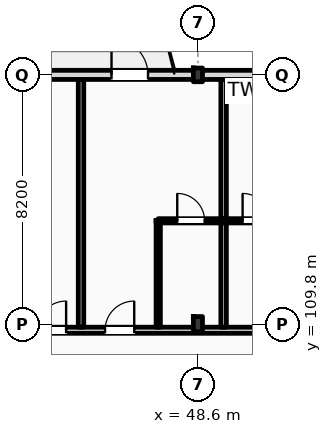
"""IFC4 building model, lengths in metres.
Left out: names, types, materials, properties, quantities, classifications, styles, units other than length and angle.
Written with IfcOpenShell. Run it as: python <this file> out.ifc"""

import sys

from ifc_helpers import new_model, si_unit, direction, frame, frame_2d, origin, origin_2d, place, context, subcontext, project, spatial, rectangle, i_section, extrude, element, fill, save


model = new_model("IFC4")
c1 = context("Model", 3, precision=1e-05, world=origin(), true_north=direction((0.0, 1.0)))
c2 = subcontext(c1, "Body", "Model", "MODEL_VIEW")
j1 = project(units=[si_unit("LENGTHUNIT", "METRE"), si_unit("PLANEANGLEUNIT", "RADIAN")], contexts=[c1])
p1 = place(None, origin())
s1 = spatial("IfcSite", under=j1, at=p1, CompositionType="ELEMENT")
p2 = place(p1, origin())
s2 = spatial("IfcBuilding", under=s1, at=p2, CompositionType="ELEMENT")
p3 = place(p2, frame((0.0, 0.0, 28.2)))
s3 = spatial("IfcBuildingStorey", under=s2, at=p3, CompositionType="ELEMENT", Elevation=28.2)
p4 = place(p3, frame((48.6, 109.8, 0.0), z_axis=(0.0, 0.0, 1.0), x_axis=(1.0, 0.0, 0.0)))
e1 = element("IfcColumn", 1, at=p4, inside=s3, PredefinedType="COLUMN", context=c2, shape_type="SweptSolid", body=[
    extrude(i_section(OverallWidth=0.3, OverallDepth=0.5, WebThickness=0.014, FlangeThickness=0.028, FilletRadius=0.027, at=origin_2d()), origin(), (0.0, 0.0, 1.0), 3.6),
])
p5 = place(p3, frame((48.6, 118.0, 0.0), z_axis=(0.0, 0.0, 1.0), x_axis=(1.0, 0.0, 0.0)))
e2 = element("IfcColumn", 2, at=p5, inside=s3, PredefinedType="COLUMN", context=c2, shape_type="SweptSolid", body=[
    extrude(i_section(OverallWidth=0.3, OverallDepth=0.45, WebThickness=0.014, FlangeThickness=0.026, FilletRadius=0.027, at=origin_2d()), origin(), (0.0, 0.0, 1.0), 3.6),
])
p6 = place(p3, frame((22.5, 118.0, 0.0), z_axis=(0.0, 0.0, 1.0), x_axis=(1.0, 0.0, 0.0)))
e3 = element("IfcWall", 3, at=p6, inside=s3, PredefinedType="STANDARD", context=c2, shape_type="SweptSolid", body=[
    extrude(rectangle(XDim=97.5, YDim=0.3, at=frame_2d((48.75, 0.0))), origin(), (0.0, 0.0, 1.0), 2.8),
])
p7 = place(p6, frame((0.91, 0.0, 0.9)))
e4 = element("IfcOpeningElement", 4, at=p7, cuts=e3, PredefinedType="OPENING", context=c2, shape_type="SweptSolid", body=[
    extrude(rectangle(XDim=0.9, YDim=1.72, at=frame_2d((0.45, 0.86))), frame((0.0, 0.16, 0.0), z_axis=(0.0, -1.0, 0.0), x_axis=(1.0, 0.0, 0.0)), (0.0, 0.0, 1.0), 0.32),
])
p8 = place(p6, frame((6.561, 0.0, 0.0)))
e5 = element("IfcOpeningElement", 5, at=p8, cuts=e3, PredefinedType="OPENING", context=c2, shape_type="SweptSolid", body=[
    extrude(rectangle(XDim=1.2, YDim=2.25, at=frame_2d((0.6, 1.125))), frame((0.0, 0.16, 0.0), z_axis=(0.0, -1.0, 0.0), x_axis=(1.0, 0.0, 0.0)), (0.0, 0.0, 1.0), 0.32),
])
p9 = place(p6, frame((11.477, 0.0, 0.9)))
e6 = element("IfcOpeningElement", 6, at=p9, cuts=e3, PredefinedType="OPENING", context=c2, shape_type="SweptSolid", body=[
    extrude(rectangle(XDim=1.1, YDim=1.5, at=frame_2d((0.55, 0.75))), frame((0.0, 0.16, 0.0), z_axis=(0.0, -1.0, 0.0), x_axis=(1.0, 0.0, 0.0)), (0.0, 0.0, 1.0), 0.32),
])
p10 = place(p6, frame((15.194, 0.0, 0.9)))
e7 = element("IfcOpeningElement", 7, at=p10, cuts=e3, PredefinedType="OPENING", context=c2, shape_type="SweptSolid", body=[
    extrude(rectangle(XDim=1.25, YDim=1.6, at=frame_2d((0.625, 0.8))), frame((0.0, 0.16, 0.0), z_axis=(0.0, -1.0, 0.0), x_axis=(1.0, 0.0, 0.0)), (0.0, 0.0, 1.0), 0.32),
])
p11 = place(p6, frame((19.509, 0.0, 0.9)))
e8 = element("IfcOpeningElement", 8, at=p11, cuts=e3, PredefinedType="OPENING", context=c2, shape_type="SweptSolid", body=[
    extrude(rectangle(XDim=1.4, YDim=1.7, at=frame_2d((0.7, 0.85))), frame((0.0, 0.16, 0.0), z_axis=(0.0, -1.0, 0.0), x_axis=(1.0, 0.0, 0.0)), (0.0, 0.0, 1.0), 0.32),
])
p12 = place(p6, frame((23.258, 0.0, 0.0)))
e9 = element("IfcOpeningElement", 9, at=p12, cuts=e3, PredefinedType="OPENING", context=c2, shape_type="SweptSolid", body=[
    extrude(rectangle(XDim=1.2, YDim=2.25, at=frame_2d((0.6, 1.125))), frame((0.0, 0.16, 0.0), z_axis=(0.0, -1.0, 0.0), x_axis=(1.0, 0.0, 0.0)), (0.0, 0.0, 1.0), 0.32),
])
p13 = place(p6, frame((28.115, 0.0, 0.9)))
e10 = element("IfcOpeningElement", 10, at=p13, cuts=e3, PredefinedType="OPENING", context=c2, shape_type="SweptSolid", body=[
    extrude(rectangle(XDim=1.75, YDim=1.72, at=frame_2d((0.875, 0.86))), frame((0.0, 0.16, 0.0), z_axis=(0.0, -1.0, 0.0), x_axis=(1.0, 0.0, 0.0)), (0.0, 0.0, 1.0), 0.32),
])
p14 = place(p6, frame((31.582, 0.0, 0.9)))
e11 = element("IfcOpeningElement", 11, at=p14, cuts=e3, PredefinedType="OPENING", context=c2, shape_type="SweptSolid", body=[
    extrude(rectangle(XDim=1.35, YDim=1.72, at=frame_2d((0.675, 0.86))), frame((0.0, 0.16, 0.0), z_axis=(0.0, -1.0, 0.0), x_axis=(1.0, 0.0, 0.0)), (0.0, 0.0, 1.0), 0.32),
])
p15 = place(p6, frame((37.379, 0.0, 0.0)))
e12 = element("IfcOpeningElement", 12, at=p15, cuts=e3, PredefinedType="OPENING", context=c2, shape_type="SweptSolid", body=[
    extrude(rectangle(XDim=1.2, YDim=2.25, at=frame_2d((0.6, 1.125))), frame((0.0, 0.16, 0.0), z_axis=(0.0, -1.0, 0.0), x_axis=(1.0, 0.0, 0.0)), (0.0, 0.0, 1.0), 0.32),
])
p16 = place(p6, frame((42.663, 0.0, 0.9)))
e13 = element("IfcOpeningElement", 13, at=p16, cuts=e3, PredefinedType="OPENING", context=c2, shape_type="SweptSolid", body=[
    extrude(rectangle(XDim=1.35, YDim=1.72, at=frame_2d((0.675, 0.86))), frame((0.0, 0.16, 0.0), z_axis=(0.0, -1.0, 0.0), x_axis=(1.0, 0.0, 0.0)), (0.0, 0.0, 1.0), 0.32),
])
p17 = place(p6, frame((45.119, 0.0, 0.9)))
e14 = element("IfcOpeningElement", 14, at=p17, cuts=e3, PredefinedType="OPENING", context=c2, shape_type="SweptSolid", body=[
    extrude(rectangle(XDim=2.871, YDim=1.72, at=frame_2d((1.436, 0.86))), frame((0.0, 0.16, 0.0), z_axis=(0.0, -1.0, 0.0), x_axis=(1.0, 0.0, 0.0)), (0.0, 0.0, 1.0), 0.32),
])
p18 = place(p6, frame((50.41, 0.0, 0.9)))
e15 = element("IfcOpeningElement", 15, at=p18, cuts=e3, PredefinedType="OPENING", context=c2, shape_type="SweptSolid", body=[
    extrude(rectangle(XDim=1.8, YDim=1.72, at=frame_2d((0.9, 0.86))), frame((0.0, 0.16, 0.0), z_axis=(0.0, -1.0, 0.0), x_axis=(1.0, 0.0, 0.0)), (0.0, 0.0, 1.0), 0.32),
])
p19 = place(p6, frame((54.375, 0.0, 0.0)))
e16 = element("IfcOpeningElement", 16, at=p19, cuts=e3, PredefinedType="OPENING", context=c2, shape_type="SweptSolid", body=[
    extrude(rectangle(XDim=1.2, YDim=2.25, at=frame_2d((0.6, 1.125))), frame((0.0, 0.16, 0.0), z_axis=(0.0, -1.0, 0.0), x_axis=(1.0, 0.0, 0.0)), (0.0, 0.0, 1.0), 0.32),
])
p20 = place(p6, frame((59.052, 0.0, 0.9)))
e17 = element("IfcOpeningElement", 17, at=p20, cuts=e3, PredefinedType="OPENING", context=c2, shape_type="SweptSolid", body=[
    extrude(rectangle(XDim=1.35, YDim=1.72, at=frame_2d((0.675, 0.86))), frame((0.0, 0.16, 0.0), z_axis=(0.0, -1.0, 0.0), x_axis=(1.0, 0.0, 0.0)), (0.0, 0.0, 1.0), 0.32),
])
p21 = place(p6, frame((62.768, 0.0, 0.9)))
e18 = element("IfcOpeningElement", 18, at=p21, cuts=e3, PredefinedType="OPENING", context=c2, shape_type="SweptSolid", body=[
    extrude(rectangle(XDim=1.5, YDim=1.72, at=frame_2d((0.75, 0.86))), frame((0.0, 0.16, 0.0), z_axis=(0.0, -1.0, 0.0), x_axis=(1.0, 0.0, 0.0)), (0.0, 0.0, 1.0), 0.32),
])
p22 = place(p6, frame((68.498, 0.0, 0.0)))
e19 = element("IfcOpeningElement", 19, at=p22, cuts=e3, PredefinedType="OPENING", context=c2, shape_type="SweptSolid", body=[
    extrude(rectangle(XDim=1.2, YDim=2.25, at=frame_2d((0.6, 1.125))), frame((0.0, 0.16, 0.0), z_axis=(0.0, -1.0, 0.0), x_axis=(1.0, 0.0, 0.0)), (0.0, 0.0, 1.0), 0.32),
])
p23 = place(p6, frame((71.265, 0.0, 0.9)))
e20 = element("IfcOpeningElement", 20, at=p23, cuts=e3, PredefinedType="OPENING", context=c2, shape_type="SweptSolid", body=[
    extrude(rectangle(XDim=0.9, YDim=1.72, at=frame_2d((0.45, 0.86))), frame((0.0, 0.16, 0.0), z_axis=(0.0, -1.0, 0.0), x_axis=(1.0, 0.0, 0.0)), (0.0, 0.0, 1.0), 0.32),
])
p24 = place(p6, frame((76.316, 0.0, 0.9)))
e21 = element("IfcOpeningElement", 21, at=p24, cuts=e3, PredefinedType="OPENING", context=c2, shape_type="SweptSolid", body=[
    extrude(rectangle(XDim=1.95, YDim=1.72, at=frame_2d((0.975, 0.86))), frame((0.0, 0.16, 0.0), z_axis=(0.0, -1.0, 0.0), x_axis=(1.0, 0.0, 0.0)), (0.0, 0.0, 1.0), 0.32),
])
p25 = place(p6, frame((81.632, 0.0, 0.9)))
e22 = element("IfcOpeningElement", 22, at=p25, cuts=e3, PredefinedType="OPENING", context=c2, shape_type="SweptSolid", body=[
    extrude(rectangle(XDim=1.35, YDim=1.72, at=frame_2d((0.675, 0.86))), frame((0.0, 0.16, 0.0), z_axis=(0.0, -1.0, 0.0), x_axis=(1.0, 0.0, 0.0)), (0.0, 0.0, 1.0), 0.32),
])
p26 = place(p6, frame((84.948, 0.0, 0.9)))
e23 = element("IfcOpeningElement", 23, at=p26, cuts=e3, PredefinedType="OPENING", context=c2, shape_type="SweptSolid", body=[
    extrude(rectangle(XDim=2.25, YDim=1.72, at=frame_2d((1.125, 0.86))), frame((0.0, 0.16, 0.0), z_axis=(0.0, -1.0, 0.0), x_axis=(1.0, 0.0, 0.0)), (0.0, 0.0, 1.0), 0.32),
])
p27 = place(p6, frame((90.063, 0.0, 0.9)))
e24 = element("IfcOpeningElement", 24, at=p27, cuts=e3, PredefinedType="OPENING", context=c2, shape_type="SweptSolid", body=[
    extrude(rectangle(XDim=1.8, YDim=1.72, at=frame_2d((0.9, 0.86))), frame((0.0, 0.16, 0.0), z_axis=(0.0, -1.0, 0.0), x_axis=(1.0, 0.0, 0.0)), (0.0, 0.0, 1.0), 0.32),
])
p28 = place(p6, frame((93.529, 0.0, 0.9)))
e25 = element("IfcOpeningElement", 25, at=p28, cuts=e3, PredefinedType="OPENING", context=c2, shape_type="SweptSolid", body=[
    extrude(rectangle(XDim=2.55, YDim=1.72, at=frame_2d((1.275, 0.86))), frame((0.0, 0.16, 0.0), z_axis=(0.0, -1.0, 0.0), x_axis=(1.0, 0.0, 0.0)), (0.0, 0.0, 1.0), 0.32),
])
p29 = place(p3, frame((10.65, 109.6, 0.0), z_axis=(0.0, 0.0, 1.0), x_axis=(1.0, 0.0, 0.0)))
e26 = element("IfcWall", 26, at=p29, inside=s3, PredefinedType="PARTITIONING", context=c2, shape_type="SweptSolid", body=[
    extrude(rectangle(XDim=109.21, YDim=0.2, at=frame_2d((54.605, 0.0))), origin(), (0.0, 0.0, 1.0), 2.8),
])
p30 = place(p29, frame((12.611, 0.0, 0.0)))
e27 = element("IfcOpeningElement", 27, at=p30, cuts=e26, PredefinedType="OPENING", context=c2, shape_type="SweptSolid", body=[
    extrude(rectangle(XDim=1.02, YDim=2.2, at=frame_2d((0.51, 1.1))), frame((0.0, 0.11, 0.0), z_axis=(0.0, -1.0, 0.0), x_axis=(1.0, 0.0, 0.0)), (0.0, 0.0, 1.0), 0.22),
])
p31 = place(p29, frame((19.451, 0.0, 0.0)))
e28 = element("IfcOpeningElement", 28, at=p31, cuts=e26, PredefinedType="OPENING", context=c2, shape_type="SweptSolid", body=[
    extrude(rectangle(XDim=1.02, YDim=2.2, at=frame_2d((0.51, 1.1))), frame((0.0, 0.11, 0.0), z_axis=(0.0, -1.0, 0.0), x_axis=(1.0, 0.0, 0.0)), (0.0, 0.0, 1.0), 0.22),
])
p32 = place(p29, frame((23.842, 0.0, 0.0)))
e29 = element("IfcOpeningElement", 29, at=p32, cuts=e26, PredefinedType="OPENING", context=c2, shape_type="SweptSolid", body=[
    extrude(rectangle(XDim=1.02, YDim=2.2, at=frame_2d((0.51, 1.1))), frame((0.0, 0.11, 0.0), z_axis=(0.0, -1.0, 0.0), x_axis=(1.0, 0.0, 0.0)), (0.0, 0.0, 1.0), 0.22),
])
p33 = place(p29, frame((26.084, 0.0, 0.0)))
e30 = element("IfcOpeningElement", 30, at=p33, cuts=e26, PredefinedType="OPENING", context=c2, shape_type="SweptSolid", body=[
    extrude(rectangle(XDim=1.02, YDim=2.2, at=frame_2d((0.51, 1.1))), frame((0.0, 0.11, 0.0), z_axis=(0.0, -1.0, 0.0), x_axis=(1.0, 0.0, 0.0)), (0.0, 0.0, 1.0), 0.22),
])
p34 = place(p29, frame((32.655, 0.0, 0.0)))
e31 = element("IfcOpeningElement", 31, at=p34, cuts=e26, PredefinedType="OPENING", context=c2, shape_type="SweptSolid", body=[
    extrude(rectangle(XDim=0.96, YDim=2.2, at=frame_2d((0.48, 1.1))), frame((0.0, 0.11, 0.0), z_axis=(0.0, -1.0, 0.0), x_axis=(1.0, 0.0, 0.0)), (0.0, 0.0, 1.0), 0.22),
])
p35 = place(p29, frame((34.895, 0.0, 0.0)))
e32 = element("IfcOpeningElement", 32, at=p35, cuts=e26, PredefinedType="OPENING", context=c2, shape_type="SweptSolid", body=[
    extrude(rectangle(XDim=0.96, YDim=2.2, at=frame_2d((0.48, 1.1))), frame((0.0, 0.11, 0.0), z_axis=(0.0, -1.0, 0.0), x_axis=(1.0, 0.0, 0.0)), (0.0, 0.0, 1.0), 0.22),
])
p36 = place(p29, frame((41.436, 0.0, 0.0)))
e33 = element("IfcOpeningElement", 33, at=p36, cuts=e26, PredefinedType="OPENING", context=c2, shape_type="SweptSolid", body=[
    extrude(rectangle(XDim=0.96, YDim=2.2, at=frame_2d((0.48, 1.1))), frame((0.0, 0.11, 0.0), z_axis=(0.0, -1.0, 0.0), x_axis=(1.0, 0.0, 0.0)), (0.0, 0.0, 1.0), 0.22),
])
p37 = place(p29, frame((43.427, 0.0, 0.0)))
e34 = element("IfcOpeningElement", 34, at=p37, cuts=e26, PredefinedType="OPENING", context=c2, shape_type="SweptSolid", body=[
    extrude(rectangle(XDim=0.96, YDim=2.2, at=frame_2d((0.48, 1.1))), frame((0.0, 0.11, 0.0), z_axis=(0.0, -1.0, 0.0), x_axis=(1.0, 0.0, 0.0)), (0.0, 0.0, 1.0), 0.22),
])
p38 = place(p29, frame((50.218, 0.0, 0.0)))
e35 = element("IfcOpeningElement", 35, at=p38, cuts=e26, PredefinedType="OPENING", context=c2, shape_type="SweptSolid", body=[
    extrude(rectangle(XDim=0.96, YDim=2.2, at=frame_2d((0.48, 1.1))), frame((0.0, 0.11, 0.0), z_axis=(0.0, -1.0, 0.0), x_axis=(1.0, 0.0, 0.0)), (0.0, 0.0, 1.0), 0.22),
])
p39 = place(p29, frame((54.859, 0.0, 0.0)))
e36 = element("IfcOpeningElement", 36, at=p39, cuts=e26, PredefinedType="OPENING", context=c2, shape_type="SweptSolid", body=[
    extrude(rectangle(XDim=0.96, YDim=2.2, at=frame_2d((0.48, 1.1))), frame((0.0, 0.11, 0.0), z_axis=(0.0, -1.0, 0.0), x_axis=(1.0, 0.0, 0.0)), (0.0, 0.0, 1.0), 0.22),
])
p40 = place(p29, frame((59.0, 0.0, 0.0)))
e37 = element("IfcOpeningElement", 37, at=p40, cuts=e26, PredefinedType="OPENING", context=c2, shape_type="SweptSolid", body=[
    extrude(rectangle(XDim=0.96, YDim=2.2, at=frame_2d((0.48, 1.1))), frame((0.0, 0.11, 0.0), z_axis=(0.0, -1.0, 0.0), x_axis=(1.0, 0.0, 0.0)), (0.0, 0.0, 1.0), 0.22),
])
p41 = place(p29, frame((63.39, 0.0, 0.0)))
e38 = element("IfcOpeningElement", 38, at=p41, cuts=e26, PredefinedType="OPENING", context=c2, shape_type="SweptSolid", body=[
    extrude(rectangle(XDim=0.96, YDim=2.2, at=frame_2d((0.48, 1.1))), frame((0.0, 0.11, 0.0), z_axis=(0.0, -1.0, 0.0), x_axis=(1.0, 0.0, 0.0)), (0.0, 0.0, 1.0), 0.22),
])
p42 = place(p29, frame((65.631, 0.0, 0.0)))
e39 = element("IfcOpeningElement", 39, at=p42, cuts=e26, PredefinedType="OPENING", context=c2, shape_type="SweptSolid", body=[
    extrude(rectangle(XDim=0.96, YDim=2.2, at=frame_2d((0.48, 1.1))), frame((0.0, 0.11, 0.0), z_axis=(0.0, -1.0, 0.0), x_axis=(1.0, 0.0, 0.0)), (0.0, 0.0, 1.0), 0.22),
])
p43 = place(p29, frame((72.172, 0.0, 0.0)))
e40 = element("IfcOpeningElement", 40, at=p43, cuts=e26, PredefinedType="OPENING", context=c2, shape_type="SweptSolid", body=[
    extrude(rectangle(XDim=0.96, YDim=2.2, at=frame_2d((0.48, 1.1))), frame((0.0, 0.11, 0.0), z_axis=(0.0, -1.0, 0.0), x_axis=(1.0, 0.0, 0.0)), (0.0, 0.0, 1.0), 0.22),
])
p44 = place(p29, frame((74.413, 0.0, 0.0)))
e41 = element("IfcOpeningElement", 41, at=p44, cuts=e26, PredefinedType="OPENING", context=c2, shape_type="SweptSolid", body=[
    extrude(rectangle(XDim=0.96, YDim=2.2, at=frame_2d((0.48, 1.1))), frame((0.0, 0.11, 0.0), z_axis=(0.0, -1.0, 0.0), x_axis=(1.0, 0.0, 0.0)), (0.0, 0.0, 1.0), 0.22),
])
p45 = place(p29, frame((80.954, 0.0, 0.0)))
e42 = element("IfcOpeningElement", 42, at=p45, cuts=e26, PredefinedType="OPENING", context=c2, shape_type="SweptSolid", body=[
    extrude(rectangle(XDim=0.96, YDim=2.2, at=frame_2d((0.48, 1.1))), frame((0.0, 0.11, 0.0), z_axis=(0.0, -1.0, 0.0), x_axis=(1.0, 0.0, 0.0)), (0.0, 0.0, 1.0), 0.22),
])
p46 = place(p29, frame((83.195, 0.0, 0.0)))
e43 = element("IfcOpeningElement", 43, at=p46, cuts=e26, PredefinedType="OPENING", context=c2, shape_type="SweptSolid", body=[
    extrude(rectangle(XDim=0.96, YDim=2.2, at=frame_2d((0.48, 1.1))), frame((0.0, 0.11, 0.0), z_axis=(0.0, -1.0, 0.0), x_axis=(1.0, 0.0, 0.0)), (0.0, 0.0, 1.0), 0.22),
])
p47 = place(p29, frame((89.735, 0.0, 0.0)))
e44 = element("IfcOpeningElement", 44, at=p47, cuts=e26, PredefinedType="OPENING", context=c2, shape_type="SweptSolid", body=[
    extrude(rectangle(XDim=0.96, YDim=2.2, at=frame_2d((0.48, 1.1))), frame((0.0, 0.11, 0.0), z_axis=(0.0, -1.0, 0.0), x_axis=(1.0, 0.0, 0.0)), (0.0, 0.0, 1.0), 0.22),
])
p48 = place(p29, frame((94.126, 0.0, 0.0)))
e45 = element("IfcOpeningElement", 45, at=p48, cuts=e26, PredefinedType="OPENING", context=c2, shape_type="SweptSolid", body=[
    extrude(rectangle(XDim=0.96, YDim=2.2, at=frame_2d((0.48, 1.1))), frame((0.0, 0.11, 0.0), z_axis=(0.0, -1.0, 0.0), x_axis=(1.0, 0.0, 0.0)), (0.0, 0.0, 1.0), 0.22),
])
p49 = place(p29, frame((98.517, 0.0, 0.0)))
e46 = element("IfcOpeningElement", 46, at=p49, cuts=e26, PredefinedType="OPENING", context=c2, shape_type="SweptSolid", body=[
    extrude(rectangle(XDim=0.96, YDim=2.2, at=frame_2d((0.48, 1.1))), frame((0.0, 0.11, 0.0), z_axis=(0.0, -1.0, 0.0), x_axis=(1.0, 0.0, 0.0)), (0.0, 0.0, 1.0), 0.22),
])
p50 = place(p29, frame((102.908, 0.0, 0.0)))
e47 = element("IfcOpeningElement", 47, at=p50, cuts=e26, PredefinedType="OPENING", context=c2, shape_type="SweptSolid", body=[
    extrude(rectangle(XDim=0.96, YDim=2.2, at=frame_2d((0.48, 1.1))), frame((0.0, 0.11, 0.0), z_axis=(0.0, -1.0, 0.0), x_axis=(1.0, 0.0, 0.0)), (0.0, 0.0, 1.0), 0.22),
])
p51 = place(p29, frame((105.099, 0.0, 0.0)))
e48 = element("IfcOpeningElement", 48, at=p51, cuts=e26, PredefinedType="OPENING", context=c2, shape_type="SweptSolid", body=[
    extrude(rectangle(XDim=0.96, YDim=2.2, at=frame_2d((0.48, 1.1))), frame((0.0, 0.11, 0.0), z_axis=(0.0, -1.0, 0.0), x_axis=(1.0, 0.0, 0.0)), (0.0, 0.0, 1.0), 0.22),
])
p52 = place(p29, frame((2.716, 0.0, 0.0)))
e49 = element("IfcOpeningElement", 49, at=p52, cuts=e26, PredefinedType="OPENING", context=c2, shape_type="SweptSolid", body=[
    extrude(rectangle(XDim=1.35, YDim=2.25, at=frame_2d((0.675, 1.125))), frame((0.0, 0.11, 0.0), z_axis=(0.0, -1.0, 0.0), x_axis=(1.0, 0.0, 0.0)), (0.0, 0.0, 1.0), 0.22),
])
p53 = place(p29, frame((6.65, 0.0, 0.0)))
e50 = element("IfcOpeningElement", 50, at=p53, cuts=e26, PredefinedType="OPENING", context=c2, shape_type="SweptSolid", body=[
    extrude(rectangle(XDim=1.35, YDim=2.25, at=frame_2d((0.675, 1.125))), frame((0.0, 0.11, 0.0), z_axis=(0.0, -1.0, 0.0), x_axis=(1.0, 0.0, 0.0)), (0.0, 0.0, 1.0), 0.22),
])
p54 = place(p29, frame((10.583, 0.0, 0.0)))
e51 = element("IfcOpeningElement", 51, at=p54, cuts=e26, PredefinedType="OPENING", context=c2, shape_type="SweptSolid", body=[
    extrude(rectangle(XDim=1.35, YDim=2.25, at=frame_2d((0.675, 1.125))), frame((0.0, 0.11, 0.0), z_axis=(0.0, -1.0, 0.0), x_axis=(1.0, 0.0, 0.0)), (0.0, 0.0, 1.0), 0.22),
])
for number, where, z_axis, x_axis in (
    (52, (44.755, 109.7, 0.0), (0.0, 0.0, 1.0), (0.0, 1.0, 0.0)),
    (53, (49.445, 109.7, 0.0), (0.0, 0.0, 1.0), (0.0, 1.0, 0.0)),
):
    element("IfcWall", number, at=place(p3, frame(where, z_axis=z_axis, x_axis=x_axis)), inside=s3, PredefinedType="PARTITIONING", context=c2, shape_type="SweptSolid", body=[
        extrude(rectangle(XDim=8.15, YDim=0.18, at=frame_2d((4.075, 0.0))), origin(), (0.0, 0.0, 1.0), 3.36),
    ])
p55 = place(p3, frame((47.295, 109.7, 0.0), z_axis=(0.0, 0.0, 1.0), x_axis=(0.0, 1.0, 0.0)))
e54 = element("IfcWall", 54, at=p55, inside=s3, PredefinedType="PARTITIONING", context=c2, shape_type="SweptSolid", body=[
    extrude(rectangle(XDim=3.5, YDim=0.14, at=frame_2d((1.75, 0.0))), origin(), (0.0, 0.0, 1.0), 3.36),
])
p56 = place(p3, frame((47.295, 113.2, 0.0), z_axis=(0.0, 0.0, 1.0), x_axis=(1.0, 0.0, 0.0)))
e55 = element("IfcWall", 55, at=p56, inside=s3, PredefinedType="PARTITIONING", context=c2, shape_type="SweptSolid", body=[
    extrude(rectangle(XDim=2.15, YDim=0.14, at=frame_2d((1.075, 0.0))), origin(), (0.0, 0.0, 1.0), 3.36),
])
p57 = place(p56, frame((0.625, 0.0, 0.0)))
e56 = element("IfcOpeningElement", 56, at=p57, cuts=e55, PredefinedType="OPENING", context=c2, shape_type="SweptSolid", body=[
    extrude(rectangle(XDim=0.9, YDim=2.1, at=frame_2d((0.45, 1.05))), frame((0.0, 0.08, 0.0), z_axis=(0.0, -1.0, 0.0), x_axis=(1.0, 0.0, 0.0)), (0.0, 0.0, 1.0), 0.16),
])
p58 = place(p3, frame((49.445, 113.2, 0.0), z_axis=(0.0, 0.0, 1.0), x_axis=(1.0, 0.0, 0.0)))
e57 = element("IfcWall", 57, at=p58, inside=s3, PredefinedType="PARTITIONING", context=c2, shape_type="SweptSolid", body=[
    extrude(rectangle(XDim=2.15, YDim=0.14, at=frame_2d((1.075, 0.0))), origin(), (0.0, 0.0, 1.0), 3.36),
])
p59 = place(p58, frame((0.625, 0.0, 0.0)))
e58 = element("IfcOpeningElement", 58, at=p59, cuts=e57, PredefinedType="OPENING", context=c2, shape_type="SweptSolid", body=[
    extrude(rectangle(XDim=0.9, YDim=2.1, at=frame_2d((0.45, 1.05))), frame((0.0, 0.08, 0.0), z_axis=(0.0, -1.0, 0.0), x_axis=(1.0, 0.0, 0.0)), (0.0, 0.0, 1.0), 0.16),
])
p60 = place(p12, origin())
e59 = element("IfcDoor", 59, at=p60, inside=s3, OperationType="SINGLE_SWING_LEFT", PredefinedType="DOOR", context=c2, shape_type="SweptSolid", body=[
    extrude(rectangle(XDim=1.2, YDim=2.25, at=frame_2d((0.6, 1.125))), frame((0.0, 0.025, 0.0), z_axis=(0.0, -1.0, 0.0), x_axis=(1.0, 0.0, 0.0)), (0.0, 0.0, 1.0), 0.05),
])
fill(e9, e59)
p61 = place(p34, origin())
e60 = element("IfcDoor", 60, at=p61, inside=s3, OperationType="SINGLE_SWING_RIGHT", PredefinedType="DOOR", context=c2, shape_type="SweptSolid", body=[
    extrude(rectangle(XDim=0.96, YDim=2.2, at=frame_2d((0.48, 1.1))), frame((0.0, 0.025, 0.0), z_axis=(0.0, -1.0, 0.0), x_axis=(1.0, 0.0, 0.0)), (0.0, 0.0, 1.0), 0.05),
])
fill(e31, e60)
p62 = place(p35, origin())
e61 = element("IfcDoor", 61, at=p62, inside=s3, OperationType="SINGLE_SWING_RIGHT", PredefinedType="DOOR", context=c2, shape_type="SweptSolid", body=[
    extrude(rectangle(XDim=0.96, YDim=2.2, at=frame_2d((0.48, 1.1))), frame((0.0, 0.025, 0.0), z_axis=(0.0, -1.0, 0.0), x_axis=(1.0, 0.0, 0.0)), (0.0, 0.0, 1.0), 0.05),
])
fill(e32, e61)
p63 = place(p57, origin())
e62 = element("IfcDoor", 62, at=p63, inside=s3, OperationType="SINGLE_SWING_LEFT", PredefinedType="DOOR", context=c2, shape_type="SweptSolid", body=[
    extrude(rectangle(XDim=0.9, YDim=2.1, at=frame_2d((0.45, 1.05))), frame((0.0, 0.025, 0.0), z_axis=(0.0, -1.0, 0.0), x_axis=(1.0, 0.0, 0.0)), (0.0, 0.0, 1.0), 0.05),
])
fill(e56, e62)
p64 = place(p59, origin())
e63 = element("IfcDoor", 63, at=p64, inside=s3, OperationType="SINGLE_SWING_LEFT", PredefinedType="DOOR", context=c2, shape_type="SweptSolid", body=[
    extrude(rectangle(XDim=0.9, YDim=2.1, at=frame_2d((0.45, 1.05))), frame((0.0, 0.025, 0.0), z_axis=(0.0, -1.0, 0.0), x_axis=(1.0, 0.0, 0.0)), (0.0, 0.0, 1.0), 0.05),
])
fill(e58, e63)
save(model, sys.argv[1])
